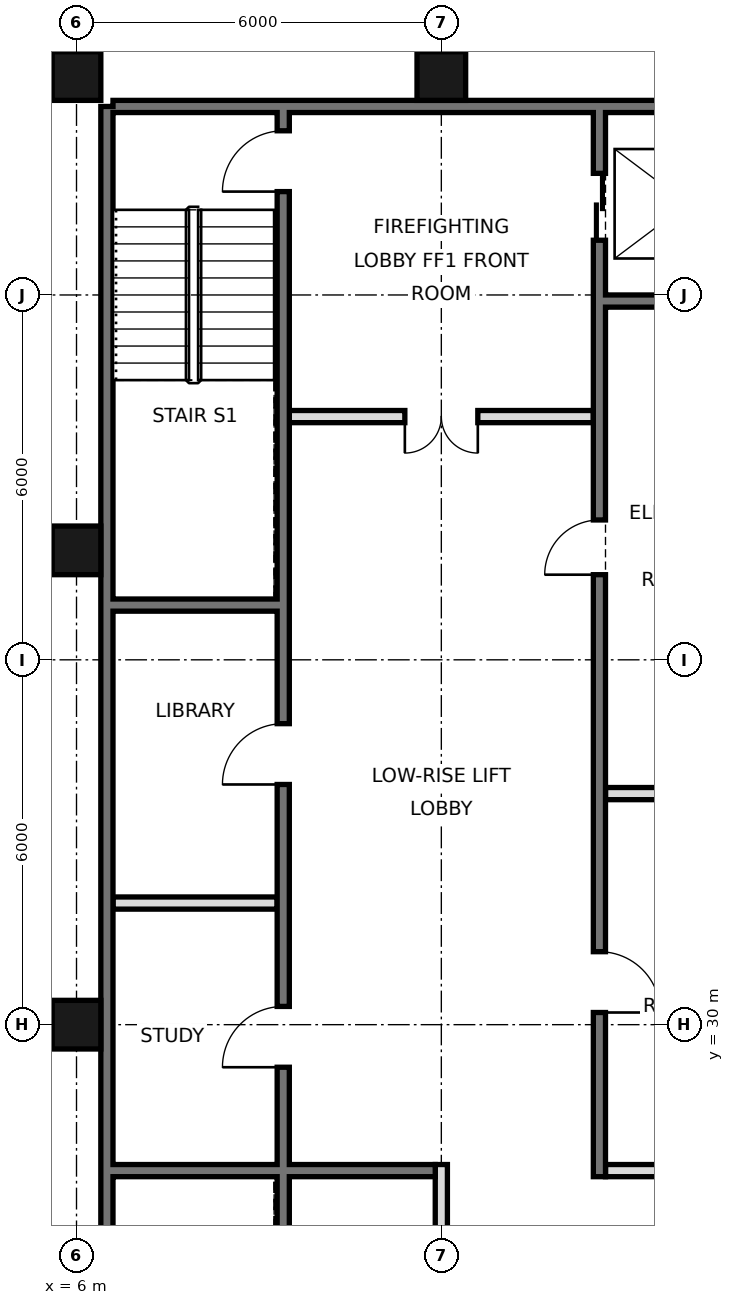
"""IFC4 building model, lengths in metres.
Left out: names, types, materials, properties, quantities, classifications, styles, units other than length and angle.
Written with IfcOpenShell. Run it as: python <this file> out.ifc"""

import sys

from ifc_helpers import new_model, si_unit, direction, frame, frame_2d, origin, origin_2d, place, context, subcontext, project, spatial, rectangle, hollow_rectangle, extrude, element, fill, save


model = new_model("IFC4")
c1 = context("Model", 3, precision=1e-05, world=origin(), true_north=direction((0.0, 1.0)))
c2 = subcontext(c1, "Body", "Model", "MODEL_VIEW")
j1 = project(units=[si_unit("LENGTHUNIT", "METRE"), si_unit("PLANEANGLEUNIT", "RADIAN")], contexts=[c1])
p1 = place(None, origin())
s1 = spatial("IfcSite", under=j1, at=p1, CompositionType="ELEMENT")
p2 = place(p1, origin())
s2 = spatial("IfcBuilding", under=s1, at=p2, CompositionType="ELEMENT")
p3 = place(p2, frame((0.0, 0.0, 294.4)))
s3 = spatial("IfcBuildingStorey", under=s2, at=p3, CompositionType="ELEMENT", Elevation=294.4)
for number, where, z_axis, x_axis in (
    (1, (6.0, 30.0, 0.0), (0.0, 0.0, 1.0), (1.0, 0.0, 0.0)),
    (2, (6.0, 37.8, 0.0), (0.0, 0.0, 1.0), (1.0, 0.0, 0.0)),
    (3, (6.0, 45.6, 0.0), (0.0, 0.0, 1.0), (1.0, 0.0, 0.0)),
    (4, (12.0, 45.6, 0.0), (0.0, 0.0, 1.0), (1.0, 0.0, 0.0)),
):
    element("IfcColumn", number, at=place(p3, frame(where, z_axis=z_axis, x_axis=x_axis)), inside=s3, PredefinedType="COLUMN", context=c2, shape_type="SweptSolid", body=[
        extrude(hollow_rectangle(XDim=0.8, YDim=0.8, WallThickness=0.032, at=origin_2d()), origin(), (0.0, 0.0, 1.0), 3.6),
    ])
p4 = place(p3, frame((6.5, 21.6, 0.0), z_axis=(0.0, 0.0, 1.0), x_axis=(0.0, 1.0, 0.0)))
e5 = element("IfcWall", 5, at=p4, inside=s3, PredefinedType="SOLIDWALL", context=c2, shape_type="SweptSolid", body=[
    extrude(rectangle(XDim=23.5, YDim=0.2, at=frame_2d((11.75, 0.0))), origin(), (0.0, 0.0, 1.0), 3.42),
])
p5 = place(p3, frame((6.6, 45.1, 0.0), z_axis=(0.0, 0.0, 1.0), x_axis=(1.0, 0.0, 0.0)))
e6 = element("IfcWall", 6, at=p5, inside=s3, PredefinedType="SOLIDWALL", context=c2, shape_type="SweptSolid", body=[
    extrude(rectangle(XDim=34.8, YDim=0.2, at=frame_2d((17.4, 0.0))), origin(), (0.0, 0.0, 1.0), 3.42),
])
p6 = place(p3, frame((12.0, 21.6, 0.0), z_axis=(0.0, 0.0, 1.0), x_axis=(0.0, 1.0, 0.0)))
e7 = element("IfcWall", 7, at=p6, inside=s3, PredefinedType="PARTITIONING", context=c2, shape_type="SweptSolid", body=[
    extrude(rectangle(XDim=6.1, YDim=0.2, at=frame_2d((3.05, 0.0))), origin(), (0.0, 0.0, 1.0), 3.42),
])
p7 = place(p3, frame((14.6, 27.5, 0.0), z_axis=(0.0, 0.0, 1.0), x_axis=(0.0, 1.0, 0.0)))
e8 = element("IfcWall", 8, at=p7, inside=s3, PredefinedType="SOLIDWALL", context=c2, shape_type="SweptSolid", body=[
    extrude(rectangle(XDim=17.5, YDim=0.2, at=frame_2d((8.75, 0.0))), origin(), (0.0, 0.0, 1.0), 3.42),
])
p8 = place(p7, frame((15.4, 0.0, 0.0)))
e9 = element("IfcOpeningElement", 9, at=p8, cuts=e8, PredefinedType="OPENING", context=c2, shape_type="SweptSolid", body=[
    extrude(rectangle(XDim=1.1, YDim=2.1, at=frame_2d((0.55, 1.05))), frame((0.0, 0.11, 0.0), z_axis=(0.0, -1.0, 0.0), x_axis=(1.0, 0.0, 0.0)), (0.0, 0.0, 1.0), 0.22),
])
p9 = place(p7, frame((2.7, 0.0, 0.0)))
e10 = element("IfcOpeningElement", 10, at=p9, cuts=e8, PredefinedType="OPENING", context=c2, shape_type="SweptSolid", body=[
    extrude(rectangle(XDim=1.0, YDim=2.1, at=frame_2d((0.5, 1.05))), frame((0.0, 0.11, 0.0), z_axis=(0.0, -1.0, 0.0), x_axis=(1.0, 0.0, 0.0)), (0.0, 0.0, 1.0), 0.22),
])
p10 = place(p7, frame((9.9, 0.0, 0.0)))
e11 = element("IfcOpeningElement", 11, at=p10, cuts=e8, PredefinedType="OPENING", context=c2, shape_type="SweptSolid", body=[
    extrude(rectangle(XDim=0.9, YDim=2.1, at=frame_2d((0.45, 1.05))), frame((0.0, 0.11, 0.0), z_axis=(0.0, -1.0, 0.0), x_axis=(1.0, 0.0, 0.0)), (0.0, 0.0, 1.0), 0.22),
])
p11 = place(p3, frame((9.4, 21.6, 0.0), z_axis=(0.0, 0.0, 1.0), x_axis=(0.0, 1.0, 0.0)))
e12 = element("IfcWall", 12, at=p11, inside=s3, PredefinedType="SOLIDWALL", context=c2, shape_type="SweptSolid", body=[
    extrude(rectangle(XDim=23.4, YDim=0.2, at=frame_2d((11.7, 0.0))), origin(), (0.0, 0.0, 1.0), 3.42),
])
p12 = place(p11, frame((7.7, 0.0, 0.0)))
e13 = element("IfcOpeningElement", 13, at=p12, cuts=e12, PredefinedType="OPENING", context=c2, shape_type="SweptSolid", body=[
    extrude(rectangle(XDim=1.0, YDim=2.1, at=frame_2d((0.5, 1.05))), frame((0.0, 0.11, 0.0), z_axis=(0.0, -1.0, 0.0), x_axis=(1.0, 0.0, 0.0)), (0.0, 0.0, 1.0), 0.22),
])
p13 = place(p11, frame((12.35, 0.0, 0.0)))
e14 = element("IfcOpeningElement", 14, at=p13, cuts=e12, PredefinedType="OPENING", context=c2, shape_type="SweptSolid", body=[
    extrude(rectangle(XDim=1.0, YDim=2.1, at=frame_2d((0.5, 1.05))), frame((0.0, 0.11, 0.0), z_axis=(0.0, -1.0, 0.0), x_axis=(1.0, 0.0, 0.0)), (0.0, 0.0, 1.0), 0.22),
])
p14 = place(p11, frame((22.1, 0.0, 0.0)))
e15 = element("IfcOpeningElement", 15, at=p14, cuts=e12, PredefinedType="OPENING", context=c2, shape_type="SweptSolid", body=[
    extrude(rectangle(XDim=1.0, YDim=2.1, at=frame_2d((0.5, 1.05))), frame((0.0, 0.11, 0.0), z_axis=(0.0, -1.0, 0.0), x_axis=(1.0, 0.0, 0.0)), (0.0, 0.0, 1.0), 0.22),
])
p15 = place(p11, frame((0.175, 0.0, 0.0)))
e16 = element("IfcOpeningElement", 16, at=p15, cuts=e12, PredefinedType="OPENING", context=c2, shape_type="SweptSolid", body=[
    extrude(rectangle(XDim=0.9, YDim=2.1, at=frame_2d((0.45, 1.05))), frame((0.0, 0.11, 0.0), z_axis=(0.0, -1.0, 0.0), x_axis=(1.0, 0.0, 0.0)), (0.0, 0.0, 1.0), 0.22),
])
p16 = place(p3, frame((14.7, 27.6, 0.0), z_axis=(0.0, 0.0, 1.0), x_axis=(1.0, 0.0, 0.0)))
e17 = element("IfcWall", 17, at=p16, inside=s3, PredefinedType="PARTITIONING", context=c2, shape_type="SweptSolid", body=[
    extrude(rectangle(XDim=2.7, YDim=0.2, at=frame_2d((1.35, 0.0))), origin(), (0.0, 0.0, 1.0), 3.42),
])
p17 = place(p3, frame((6.6, 27.6, 0.0), z_axis=(0.0, 0.0, 1.0), x_axis=(1.0, 0.0, 0.0)))
e18 = element("IfcWall", 18, at=p17, inside=s3, PredefinedType="SOLIDWALL", context=c2, shape_type="SweptSolid", body=[
    extrude(rectangle(XDim=5.3, YDim=0.2, at=frame_2d((2.65, 0.0))), origin(), (0.0, 0.0, 1.0), 3.42),
])
p18 = place(p3, frame((6.6, 32.0, 0.0), z_axis=(0.0, 0.0, 1.0), x_axis=(1.0, 0.0, 0.0)))
e19 = element("IfcWall", 19, at=p18, inside=s3, PredefinedType="PARTITIONING", context=c2, shape_type="SweptSolid", body=[
    extrude(rectangle(XDim=2.7, YDim=0.2, at=frame_2d((1.35, 0.0))), origin(), (0.0, 0.0, 1.0), 3.42),
])
for number, where, z_axis, x_axis in (
    (20, (14.7, 33.8, 0.0), (0.0, 0.0, 1.0), (1.0, 0.0, 0.0)),
    (21, (6.6, 36.9, 0.0), (0.0, 0.0, 1.0), (1.0, 0.0, 0.0)),
):
    element("IfcWall", number, at=place(p3, frame(where, z_axis=z_axis, x_axis=x_axis)), inside=s3, PredefinedType="SOLIDWALL", context=c2, shape_type="SweptSolid", body=[
        extrude(rectangle(XDim=2.7, YDim=0.2, at=frame_2d((1.35, 0.0))), origin(), (0.0, 0.0, 1.0), 3.42),
    ])
p19 = place(p3, frame((9.5, 40.0, 0.0), z_axis=(0.0, 0.0, 1.0), x_axis=(1.0, 0.0, 0.0)))
e22 = element("IfcWall", 22, at=p19, inside=s3, PredefinedType="PARTITIONING", context=c2, shape_type="SweptSolid", body=[
    extrude(rectangle(XDim=5.0, YDim=0.2, at=frame_2d((2.5, 0.0))), origin(), (0.0, 0.0, 1.0), 3.42),
])
p20 = place(p19, frame((1.9, 0.0, 0.0)))
e23 = element("IfcOpeningElement", 23, at=p20, cuts=e22, PredefinedType="OPENING", context=c2, shape_type="SweptSolid", body=[
    extrude(rectangle(XDim=1.2, YDim=2.1, at=frame_2d((0.6, 1.05))), frame((0.0, 0.11, 0.0), z_axis=(0.0, -1.0, 0.0), x_axis=(1.0, 0.0, 0.0)), (0.0, 0.0, 1.0), 0.22),
])
p21 = place(p3, frame((14.7, 41.9, 0.0), z_axis=(0.0, 0.0, 1.0), x_axis=(1.0, 0.0, 0.0)))
e24 = element("IfcWall", 24, at=p21, inside=s3, PredefinedType="SOLIDWALL", context=c2, shape_type="SweptSolid", body=[
    extrude(rectangle(XDim=2.7, YDim=0.2, at=frame_2d((1.35, 0.0))), origin(), (0.0, 0.0, 1.0), 3.42),
])
p22 = place(p20, frame((1.2, 0.0, 0.0), z_axis=(0.0, 0.0, 1.0), x_axis=(-1.0, 0.0, 0.0)))
e25 = element("IfcDoor", 25, at=p22, inside=s3, OperationType="DOUBLE_DOOR_SINGLE_SWING", PredefinedType="DOOR", context=c2, shape_type="SweptSolid", body=[
    extrude(rectangle(XDim=1.2, YDim=2.1, at=frame_2d((0.6, 1.05))), frame((0.0, 0.025, 0.0), z_axis=(0.0, -1.0, 0.0), x_axis=(1.0, 0.0, 0.0)), (0.0, 0.0, 1.0), 0.05),
])
fill(e23, e25)
p23 = place(p8, origin())
e26 = element("IfcDoor", 26, at=p23, inside=s3, OperationType="DOUBLE_DOOR_SLIDING", PredefinedType="DOOR", context=c2, shape_type="SweptSolid", body=[
    extrude(rectangle(XDim=1.1, YDim=2.1, at=frame_2d((0.55, 1.05))), frame((0.0, 0.025, 0.0), z_axis=(0.0, -1.0, 0.0), x_axis=(1.0, 0.0, 0.0)), (0.0, 0.0, 1.0), 0.05),
])
fill(e9, e26)
p24 = place(p9, frame((1.0, 0.0, 0.0), z_axis=(0.0, 0.0, 1.0), x_axis=(-1.0, 0.0, 0.0)))
e27 = element("IfcDoor", 27, at=p24, inside=s3, OperationType="SINGLE_SWING_RIGHT", PredefinedType="DOOR", context=c2, shape_type="SweptSolid", body=[
    extrude(rectangle(XDim=1.0, YDim=2.1, at=frame_2d((0.5, 1.05))), frame((0.0, 0.025, 0.0), z_axis=(0.0, -1.0, 0.0), x_axis=(1.0, 0.0, 0.0)), (0.0, 0.0, 1.0), 0.05),
])
fill(e10, e27)
p25 = place(p12, origin())
e28 = element("IfcDoor", 28, at=p25, inside=s3, OperationType="SINGLE_SWING_LEFT", PredefinedType="DOOR", context=c2, shape_type="SweptSolid", body=[
    extrude(rectangle(XDim=1.0, YDim=2.1, at=frame_2d((0.5, 1.05))), frame((0.0, 0.025, 0.0), z_axis=(0.0, -1.0, 0.0), x_axis=(1.0, 0.0, 0.0)), (0.0, 0.0, 1.0), 0.05),
])
fill(e13, e28)
p26 = place(p13, origin())
e29 = element("IfcDoor", 29, at=p26, inside=s3, OperationType="SINGLE_SWING_LEFT", PredefinedType="DOOR", context=c2, shape_type="SweptSolid", body=[
    extrude(rectangle(XDim=1.0, YDim=2.1, at=frame_2d((0.5, 1.05))), frame((0.0, 0.025, 0.0), z_axis=(0.0, -1.0, 0.0), x_axis=(1.0, 0.0, 0.0)), (0.0, 0.0, 1.0), 0.05),
])
fill(e14, e29)
p27 = place(p14, origin())
e30 = element("IfcDoor", 30, at=p27, inside=s3, OperationType="SINGLE_SWING_LEFT", PredefinedType="DOOR", context=c2, shape_type="SweptSolid", body=[
    extrude(rectangle(XDim=1.0, YDim=2.1, at=frame_2d((0.5, 1.05))), frame((0.0, 0.025, 0.0), z_axis=(0.0, -1.0, 0.0), x_axis=(1.0, 0.0, 0.0)), (0.0, 0.0, 1.0), 0.05),
])
fill(e15, e30)
p28 = place(p10, origin())
e31 = element("IfcDoor", 31, at=p28, inside=s3, OperationType="SINGLE_SWING_LEFT", PredefinedType="DOOR", context=c2, shape_type="SweptSolid", body=[
    extrude(rectangle(XDim=0.9, YDim=2.1, at=frame_2d((0.45, 1.05))), frame((0.0, 0.025, 0.0), z_axis=(0.0, -1.0, 0.0), x_axis=(1.0, 0.0, 0.0)), (0.0, 0.0, 1.0), 0.05),
])
fill(e11, e31)
save(model, sys.argv[1])
